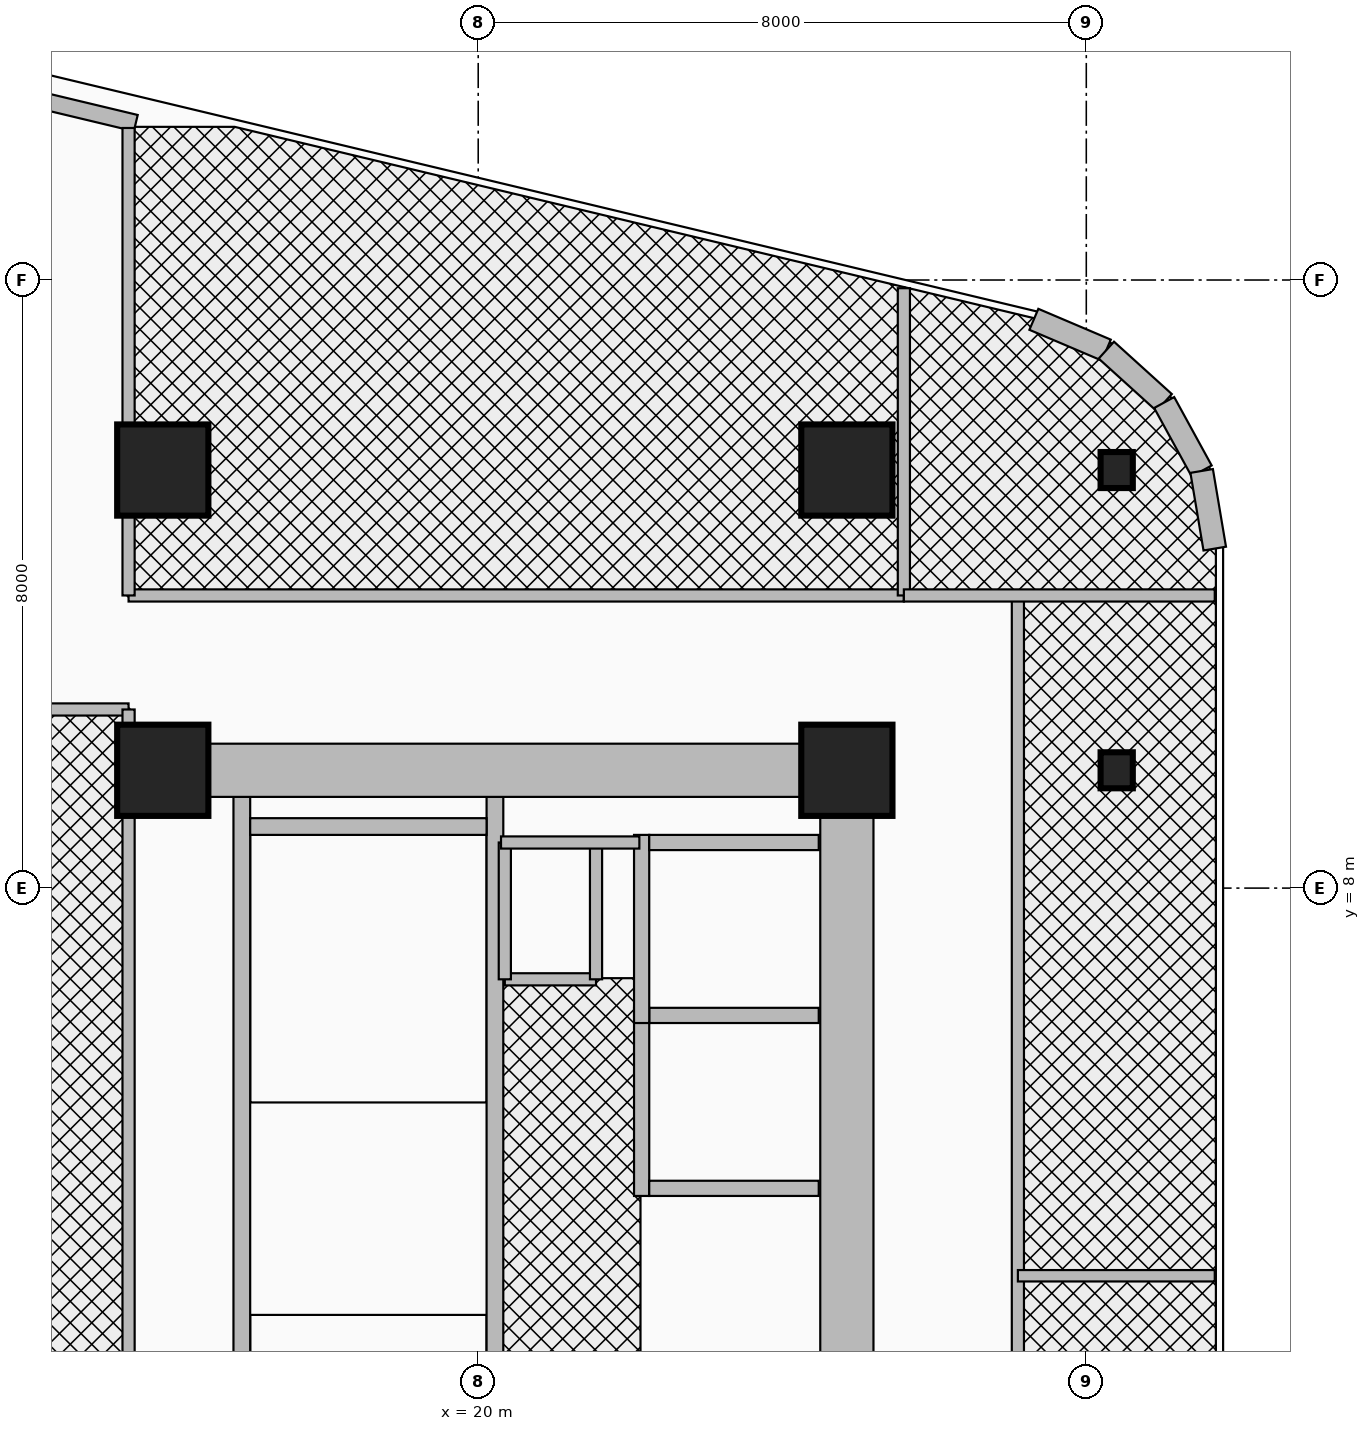
"""IFC4 building model, lengths in metres.
Left out: names, types, materials, properties, quantities, classifications, styles, units other than length and angle.
Written with IfcOpenShell. Run it as: python <this file> out.ifc"""

import sys

from ifc_helpers import new_model, si_unit, direction, frame, frame_2d, origin, origin_2d, place, context, subcontext, project, spatial, rectangle, i_section, extrude, source, transform, mapped, element, fill, save


model = new_model("IFC4")
c1 = context("Model", 3, precision=1e-05, world=origin(), true_north=direction((0.0, 1.0)))
c2 = subcontext(c1, "Body", "Model", "MODEL_VIEW")
j1 = project(units=[si_unit("LENGTHUNIT", "METRE"), si_unit("PLANEANGLEUNIT", "RADIAN")], contexts=[c1])
p1 = place(None, origin())
s1 = spatial("IfcSite", under=j1, at=p1, CompositionType="ELEMENT")
p2 = place(p1, origin())
s2 = spatial("IfcBuilding", under=s1, at=p2, CompositionType="ELEMENT")
p3 = place(p2, frame((0.0, 0.0, 131.6)))
s3 = spatial("IfcBuildingStorey", under=s2, at=p3, CompositionType="ELEMENT", Elevation=131.6)
for number, where, z_axis, x_axis in (
    (1, (16.89, 0.68, 0.0), (0.0, 0.0, 1.0), (0.0, 1.0, 0.0)),
    (2, (20.22, 0.68, 0.0), (0.0, 0.0, 1.0), (0.0, 1.0, 0.0)),
):
    element("IfcWall", number, at=place(p3, frame(where, z_axis=z_axis, x_axis=x_axis)), inside=s3, PredefinedType="SHEAR", context=c2, shape_type="SweptSolid", body=[
        extrude(rectangle(XDim=8.52, YDim=0.22, at=frame_2d((4.26, 0.0))), origin(), (0.0, 0.0, 1.0), 3.46),
    ])
p4 = place(p3, frame((17.0, 8.81, 0.0), z_axis=(0.0, 0.0, 1.0), x_axis=(1.0, 0.0, 0.0)))
e3 = element("IfcWall", 3, at=p4, inside=s3, PredefinedType="SHEAR", context=c2, shape_type="SweptSolid", body=[
    extrude(rectangle(XDim=3.11, YDim=0.22, at=frame_2d((1.555, 0.0))), origin(), (0.0, 0.0, 1.0), 3.46),
])
p5 = place(p3, frame((24.85, 0.95, 0.0), z_axis=(0.0, 0.0, 1.0), x_axis=(0.0, 1.0, 0.0)))
e4 = element("IfcWall", 4, at=p5, inside=s3, PredefinedType="SHEAR", context=c2, shape_type="SweptSolid", body=[
    extrude(rectangle(XDim=8.95, YDim=0.7, at=frame_2d((4.475, 0.0))), origin(), (0.0, 0.0, 1.0), 3.46),
])
p6 = place(p3, frame((15.85, 9.55, 0.0), z_axis=(0.0, 0.0, 1.0), x_axis=(1.0, 0.0, 0.0)))
e5 = element("IfcWall", 5, at=p6, inside=s3, PredefinedType="SHEAR", context=c2, shape_type="SweptSolid", body=[
    extrude(rectangle(XDim=9.0, YDim=0.7, at=frame_2d((4.5, 0.0))), origin(), (0.0, 0.0, 1.0), 3.46),
])
m1 = source(origin(), c2, "Body", "SweptSolid", [
    extrude(rectangle(XDim=1.2, YDim=1.2, at=origin_2d()), origin(), (0.0, 0.0, 1.0), 3.7),
])
for number, where, z_axis, x_axis in (
    (6, (15.85, 9.55, 0.0), (0.0, 0.0, 1.0), (1.0, 0.0, 0.0)),
    (7, (24.85, 9.55, 0.0), (0.0, 0.0, 1.0), (1.0, 0.0, 0.0)),
):
    element("IfcColumn", number, at=place(p3, frame(where, z_axis=z_axis, x_axis=x_axis)), inside=s3, PredefinedType="COLUMN", context=c2, shape_type="MappedRepresentation", body=[
        mapped(m1, transform((0.0, 0.0, 0.0), x_axis=(1.0, 0.0, 0.0), y_axis=(0.0, 1.0, 0.0), z_axis=(0.0, 0.0, 1.0), scale=1.0)),
    ])
m2 = source(origin(), c2, "Body", "SweptSolid", [
    extrude(i_section(OverallWidth=0.424, OverallDepth=0.474, WebThickness=0.048, FlangeThickness=0.077, at=origin_2d()), origin(), (0.0, 0.0, 1.0), 3.7),
])
p7 = place(p3, frame((28.4, 9.55, 0.0), z_axis=(0.0, 0.0, 1.0), x_axis=(1.0, 0.0, 0.0)))
e8 = element("IfcColumn", 8, at=p7, inside=s3, PredefinedType="COLUMN", context=c2, shape_type="MappedRepresentation", body=[
    mapped(m2, transform((0.0, 0.0, 0.0), x_axis=(1.0, 0.0, 0.0), y_axis=(0.0, 1.0, 0.0), z_axis=(0.0, 0.0, 1.0), scale=1.0)),
])
for number, where, z_axis, x_axis in (
    (9, (15.85, 13.5, 0.0), (0.0, 0.0, 1.0), (1.0, 0.0, 0.0)),
    (10, (24.85, 13.5, 0.0), (0.0, 0.0, 1.0), (1.0, 0.0, 0.0)),
):
    element("IfcColumn", number, at=place(p3, frame(where, z_axis=z_axis, x_axis=x_axis)), inside=s3, PredefinedType="COLUMN", context=c2, shape_type="MappedRepresentation", body=[
        mapped(m1, transform((0.0, 0.0, 0.0), x_axis=(1.0, 0.0, 0.0), y_axis=(0.0, 1.0, 0.0), z_axis=(0.0, 0.0, 1.0), scale=1.0)),
    ])
p8 = place(p3, frame((28.4, 13.5, 0.0), z_axis=(0.0, 0.0, 1.0), x_axis=(1.0, 0.0, 0.0)))
e11 = element("IfcColumn", 11, at=p8, inside=s3, PredefinedType="COLUMN", context=c2, shape_type="MappedRepresentation", body=[
    mapped(m2, transform((0.0, 0.0, 0.0), x_axis=(1.0, 0.0, 0.0), y_axis=(0.0, 1.0, 0.0), z_axis=(0.0, 0.0, 1.0), scale=1.0)),
])
p9 = place(p3, frame((13.355, 18.576, 0.0), z_axis=(0.0, 0.0, 1.0), x_axis=(0.97252211384, -0.232810519721, 0.0)))
e12 = element("IfcWall", 12, at=p9, inside=s3, PredefinedType="SOLIDWALL", context=c2, shape_type="SweptSolid", body=[
    extrude(rectangle(XDim=2.2, YDim=0.22, at=frame_2d((1.1, 0.0))), origin(), (0.0, 0.0, 1.0), 3.46),
])
p10 = place(p9, frame((0.65, 0.0, 0.95)))
e13 = element("IfcOpeningElement", 13, at=p10, cuts=e12, PredefinedType="OPENING", context=c2, shape_type="SweptSolid", body=[
    extrude(rectangle(XDim=0.9, YDim=1.3, at=frame_2d((0.45, 0.65))), frame((0.0, 0.125, 0.0), z_axis=(0.0, -1.0, 0.0), x_axis=(1.0, 0.0, 0.0)), (0.0, 0.0, 1.0), 0.25),
])
p11 = place(p3, frame((27.31, 15.483, 0.0), z_axis=(0.0, 0.0, 1.0), x_axis=(0.920250328759, -0.391330208927, 0.0)))
e14 = element("IfcWall", 14, at=p11, inside=s3, PredefinedType="SOLIDWALL", context=c2, shape_type="SweptSolid", body=[
    extrude(rectangle(XDim=1.036, YDim=0.3, at=frame_2d((0.518, 0.0))), origin(), (0.0, 0.0, 1.0), 3.46),
])
p12 = place(p3, frame((28.264, 15.077, 0.0), z_axis=(0.0, 0.0, 1.0), x_axis=(0.741208839713, -0.671274501178, 0.0)))
e15 = element("IfcWall", 15, at=p12, inside=s3, PredefinedType="SOLIDWALL", context=c2, shape_type="SweptSolid", body=[
    extrude(rectangle(XDim=1.026, YDim=0.3, at=frame_2d((0.513, 0.0))), origin(), (0.0, 0.0, 1.0), 3.46),
])
p13 = place(p3, frame((29.025, 14.388, 0.0), z_axis=(0.0, 0.0, 1.0), x_axis=(0.480284137298, -0.87711296163, 0.0)))
e16 = element("IfcWall", 16, at=p13, inside=s3, PredefinedType="SOLIDWALL", context=c2, shape_type="SweptSolid", body=[
    extrude(rectangle(XDim=1.027, YDim=0.3, at=frame_2d((0.513, 0.0))), origin(), (0.0, 0.0, 1.0), 3.46),
])
p14 = place(p3, frame((29.518, 13.488, 0.0), z_axis=(0.0, 0.0, 1.0), x_axis=(0.166156796952, -0.986099345313, 0.0)))
e17 = element("IfcWall", 17, at=p14, inside=s3, PredefinedType="SOLIDWALL", context=c2, shape_type="SweptSolid", body=[
    extrude(rectangle(XDim=1.036, YDim=0.3, at=frame_2d((0.518, 0.0))), origin(), (0.0, 0.0, 1.0), 3.46),
])
p15 = place(p3, frame((22.15, 3.95, 0.0), z_axis=(0.0, 0.0, 1.0), x_axis=(0.0, 1.0, 0.0)))
e18 = element("IfcWall", 18, at=p15, inside=s3, PredefinedType="MOVABLE", context=c2, shape_type="SweptSolid", body=[
    extrude(rectangle(XDim=2.475, YDim=0.2, at=frame_2d((1.238, 0.0))), origin(), (0.0, 0.0, 1.0), 3.46),
])
p16 = place(p15, frame((0.688, 0.0, 0.0)))
e19 = element("IfcOpeningElement", 19, at=p16, cuts=e18, PredefinedType="OPENING", context=c2, shape_type="SweptSolid", body=[
    extrude(rectangle(XDim=1.1, YDim=2.1, at=frame_2d((0.55, 1.05))), frame((0.0, 0.115, 0.0), z_axis=(0.0, -1.0, 0.0), x_axis=(1.0, 0.0, 0.0)), (0.0, 0.0, 1.0), 0.23),
])
for number, where, z_axis, x_axis in (
    (20, (22.25, 4.05, 0.0), (0.0, 0.0, 1.0), (1.0, 0.0, 0.0)),
    (21, (22.25, 6.325, 0.0), (0.0, 0.0, 1.0), (1.0, 0.0, 0.0)),
):
    element("IfcWall", number, at=place(p3, frame(where, z_axis=z_axis, x_axis=x_axis)), inside=s3, PredefinedType="MOVABLE", context=c2, shape_type="SweptSolid", body=[
        extrude(rectangle(XDim=2.23, YDim=0.2, at=frame_2d((1.115, 0.0))), origin(), (0.0, 0.0, 1.0), 2.245),
    ])
p17 = place(p3, frame((22.15, 6.225, 0.0), z_axis=(0.0, 0.0, 1.0), x_axis=(0.0, 1.0, 0.0)))
e22 = element("IfcWall", 22, at=p17, inside=s3, PredefinedType="MOVABLE", context=c2, shape_type="SweptSolid", body=[
    extrude(rectangle(XDim=2.475, YDim=0.2, at=frame_2d((1.237, 0.0))), origin(), (0.0, 0.0, 1.0), 3.46),
])
p18 = place(p17, frame((0.688, 0.0, 0.0)))
e23 = element("IfcOpeningElement", 23, at=p18, cuts=e22, PredefinedType="OPENING", context=c2, shape_type="SweptSolid", body=[
    extrude(rectangle(XDim=1.1, YDim=2.1, at=frame_2d((0.55, 1.05))), frame((0.0, 0.115, 0.0), z_axis=(0.0, -1.0, 0.0), x_axis=(1.0, 0.0, 0.0)), (0.0, 0.0, 1.0), 0.23),
])
p19 = place(p3, frame((22.25, 8.6, 0.0), z_axis=(0.0, 0.0, 1.0), x_axis=(1.0, 0.0, 0.0)))
e24 = element("IfcWall", 24, at=p19, inside=s3, PredefinedType="MOVABLE", context=c2, shape_type="SweptSolid", body=[
    extrude(rectangle(XDim=2.23, YDim=0.2, at=frame_2d((1.115, 0.0))), origin(), (0.0, 0.0, 1.0), 2.245),
])
p20 = place(p3, frame((20.35, 6.8, 0.0), z_axis=(0.0, 0.0, 1.0), x_axis=(1.0, 0.0, 0.0)))
e25 = element("IfcWall", 25, at=p20, inside=s3, PredefinedType="PARTITIONING", context=c2, shape_type="SweptSolid", body=[
    extrude(rectangle(XDim=1.2, YDim=0.16, at=frame_2d((0.6, 0.0))), origin(), (0.0, 0.0, 1.0), 3.46),
])
p21 = place(p20, frame((0.175, 0.0, 0.0)))
e26 = element("IfcOpeningElement", 26, at=p21, cuts=e25, PredefinedType="OPENING", context=c2, shape_type="SweptSolid", body=[
    extrude(rectangle(XDim=0.85, YDim=2.05, at=frame_2d((0.425, 1.025))), frame((0.0, 0.095, 0.0), z_axis=(0.0, -1.0, 0.0), x_axis=(1.0, 0.0, 0.0)), (0.0, 0.0, 1.0), 0.19),
])
for number, where, z_axis, x_axis in (
    (27, (21.55, 6.8, 0.0), (0.0, 0.0, 1.0), (0.0, 1.0, 0.0)),
    (28, (20.35, 6.8, 0.0), (0.0, 0.0, 1.0), (0.0, 1.0, 0.0)),
):
    element("IfcWall", number, at=place(p3, frame(where, z_axis=z_axis, x_axis=x_axis)), inside=s3, PredefinedType="PARTITIONING", context=c2, shape_type="SweptSolid", body=[
        extrude(rectangle(XDim=1.8, YDim=0.16, at=frame_2d((0.9, 0.0))), origin(), (0.0, 0.0, 1.0), 3.46),
    ])
p22 = place(p3, frame((20.3, 8.6, 0.0), z_axis=(0.0, 0.0, 1.0), x_axis=(1.0, 0.0, 0.0)))
e29 = element("IfcWall", 29, at=p22, inside=s3, PredefinedType="PARTITIONING", context=c2, shape_type="SweptSolid", body=[
    extrude(rectangle(XDim=1.82, YDim=0.16, at=frame_2d((0.91, 0.0))), origin(), (0.0, 0.0, 1.0), 3.46),
])
p23 = place(p3, frame((15.4, 11.85, 0.0), z_axis=(0.0, 0.0, 1.0), x_axis=(1.0, 0.0, 0.0)))
e30 = element("IfcWall", 30, at=p23, inside=s3, PredefinedType="PARTITIONING", context=c2, shape_type="SweptSolid", body=[
    extrude(rectangle(XDim=10.2, YDim=0.16, at=frame_2d((5.1, 0.0))), origin(), (0.0, 0.0, 1.0), 2.834),
])
p24 = place(p23, frame((4.65, 0.0, 0.0)))
e31 = element("IfcOpeningElement", 31, at=p24, cuts=e30, PredefinedType="OPENING", context=c2, shape_type="SweptSolid", body=[
    extrude(rectangle(XDim=0.9, YDim=2.1, at=frame_2d((0.45, 1.05))), frame((0.0, 0.095, 0.0), z_axis=(0.0, -1.0, 0.0), x_axis=(1.0, 0.0, 0.0)), (0.0, 0.0, 1.0), 0.19),
])
p25 = place(p3, frame((15.4, 11.85, 0.0), z_axis=(0.0, 0.0, 1.0), x_axis=(0.0, 1.0, 0.0)))
e32 = element("IfcWall", 32, at=p25, inside=s3, PredefinedType="PARTITIONING", context=c2, shape_type="SweptSolid", body=[
    extrude(rectangle(XDim=6.15, YDim=0.16, at=frame_2d((3.075, 0.0))), origin(), (0.0, 0.0, 1.0), 2.666),
])
p26 = place(p3, frame((25.6, 11.85, 0.0), z_axis=(0.0, 0.0, 1.0), x_axis=(0.0, 1.0, 0.0)))
e33 = element("IfcWall", 33, at=p26, inside=s3, PredefinedType="PARTITIONING", context=c2, shape_type="SweptSolid", body=[
    extrude(rectangle(XDim=4.042, YDim=0.16, at=frame_2d((2.021, 0.0))), origin(), (0.0, 0.0, 1.0), 2.666),
])
p27 = place(p3, frame((27.1, -11.661, 0.0), z_axis=(0.0, 0.0, 1.0), x_axis=(0.0, 1.0, 0.0)))
e34 = element("IfcWall", 34, at=p27, inside=s3, PredefinedType="PARTITIONING", context=c2, shape_type="SweptSolid", body=[
    extrude(rectangle(XDim=23.511, YDim=0.16, at=frame_2d((11.755, 0.0))), origin(), (0.0, 0.0, 1.0), 2.666),
])
p28 = place(p27, frame((2.56, 0.0, 0.0)))
e35 = element("IfcOpeningElement", 35, at=p28, cuts=e34, PredefinedType="OPENING", context=c2, shape_type="SweptSolid", body=[
    extrude(rectangle(XDim=0.9, YDim=2.1, at=frame_2d((0.45, 1.05))), frame((0.0, 0.095, 0.0), z_axis=(0.0, -1.0, 0.0), x_axis=(1.0, 0.0, 0.0)), (0.0, 0.0, 1.0), 0.19),
])
p29 = place(p27, frame((9.451, 0.0, 0.0)))
e36 = element("IfcOpeningElement", 36, at=p29, cuts=e34, PredefinedType="OPENING", context=c2, shape_type="SweptSolid", body=[
    extrude(rectangle(XDim=1.8, YDim=2.15, at=frame_2d((0.9, 1.075))), frame((0.0, 0.095, 0.0), z_axis=(0.0, -1.0, 0.0), x_axis=(1.0, 0.0, 0.0)), (0.0, 0.0, 1.0), 0.19),
])
p30 = place(p27, frame((18.136, 0.0, 0.0)))
e37 = element("IfcOpeningElement", 37, at=p30, cuts=e34, PredefinedType="OPENING", context=c2, shape_type="SweptSolid", body=[
    extrude(rectangle(XDim=1.8, YDim=2.15, at=frame_2d((0.9, 1.075))), frame((0.0, 0.095, 0.0), z_axis=(0.0, -1.0, 0.0), x_axis=(1.0, 0.0, 0.0)), (0.0, 0.0, 1.0), 0.19),
])
p31 = place(p3, frame((25.6, 11.85, 0.0), z_axis=(0.0, 0.0, 1.0), x_axis=(1.0, 0.0, 0.0)))
e38 = element("IfcWall", 38, at=p31, inside=s3, PredefinedType="PARTITIONING", context=c2, shape_type="SweptSolid", body=[
    extrude(rectangle(XDim=4.09, YDim=0.16, at=frame_2d((2.045, 0.0))), origin(), (0.0, 0.0, 1.0), 2.896),
])
p32 = place(p31, frame((0.3, 0.0, 0.0)))
e39 = element("IfcOpeningElement", 39, at=p32, cuts=e38, PredefinedType="OPENING", context=c2, shape_type="SweptSolid", body=[
    extrude(rectangle(XDim=0.9, YDim=2.1, at=frame_2d((0.45, 1.05))), frame((0.0, 0.095, 0.0), z_axis=(0.0, -1.0, 0.0), x_axis=(1.0, 0.0, 0.0)), (0.0, 0.0, 1.0), 0.19),
])
p33 = place(p3, frame((27.1, 2.9, 0.0), z_axis=(0.0, 0.0, 1.0), x_axis=(1.0, 0.0, 0.0)))
e40 = element("IfcWall", 40, at=p33, inside=s3, PredefinedType="PARTITIONING", context=c2, shape_type="SweptSolid", body=[
    extrude(rectangle(XDim=2.59, YDim=0.15, at=frame_2d((1.295, 0.0))), origin(), (0.0, 0.0, 1.0), 2.896),
])
p34 = place(p3, frame((13.3, 10.35, 0.0), z_axis=(0.0, 0.0, 1.0), x_axis=(1.0, 0.0, 0.0)))
e41 = element("IfcWall", 41, at=p34, inside=s3, PredefinedType="PARTITIONING", context=c2, shape_type="SweptSolid", body=[
    extrude(rectangle(XDim=2.1, YDim=0.16, at=frame_2d((1.05, 0.0))), origin(), (0.0, 0.0, 1.0), 2.666),
])
p35 = place(p34, frame((0.45, 0.0, 0.0)))
e42 = element("IfcOpeningElement", 42, at=p35, cuts=e41, PredefinedType="OPENING", context=c2, shape_type="SweptSolid", body=[
    extrude(rectangle(XDim=0.9, YDim=2.1, at=frame_2d((0.45, 1.05))), frame((0.0, 0.095, 0.0), z_axis=(0.0, -1.0, 0.0), x_axis=(1.0, 0.0, 0.0)), (0.0, 0.0, 1.0), 0.19),
])
p36 = place(p3, frame((15.4, 1.0, 0.0), z_axis=(0.0, 0.0, 1.0), x_axis=(0.0, 1.0, 0.0)))
e43 = element("IfcWall", 43, at=p36, inside=s3, PredefinedType="PARTITIONING", context=c2, shape_type="SweptSolid", body=[
    extrude(rectangle(XDim=9.35, YDim=0.16, at=frame_2d((4.675, 0.0))), origin(), (0.0, 0.0, 1.0), 2.245),
])
p37 = place(p10, origin())
e44 = element("IfcWindow", 44, at=p37, inside=s3, PartitioningType="SINGLE_PANEL", PredefinedType="WINDOW", context=c2, shape_type="SweptSolid", body=[
    extrude(rectangle(XDim=0.9, YDim=1.3, at=frame_2d((0.45, 0.65))), frame((0.0, 0.03, 0.0), z_axis=(0.0, -1.0, 0.0), x_axis=(1.0, 0.0, 0.0)), (0.0, 0.0, 1.0), 0.06),
])
fill(e13, e44)
p38 = place(p16, origin())
e45 = element("IfcDoor", 45, at=p38, inside=s3, OperationType="DOUBLE_DOOR_SLIDING", PredefinedType="DOOR", context=c2, shape_type="SweptSolid", body=[
    extrude(rectangle(XDim=1.1, YDim=2.1, at=frame_2d((0.55, 1.05))), frame((0.0, 0.025, 0.0), z_axis=(0.0, -1.0, 0.0), x_axis=(1.0, 0.0, 0.0)), (0.0, 0.0, 1.0), 0.05),
])
fill(e19, e45)
p39 = place(p18, origin())
e46 = element("IfcDoor", 46, at=p39, inside=s3, OperationType="DOUBLE_DOOR_SLIDING", PredefinedType="DOOR", context=c2, shape_type="SweptSolid", body=[
    extrude(rectangle(XDim=1.1, YDim=2.1, at=frame_2d((0.55, 1.05))), frame((0.0, 0.025, 0.0), z_axis=(0.0, -1.0, 0.0), x_axis=(1.0, 0.0, 0.0)), (0.0, 0.0, 1.0), 0.05),
])
fill(e23, e46)
p40 = place(p21, origin())
e47 = element("IfcDoor", 47, at=p40, inside=s3, OperationType="SINGLE_SWING_RIGHT", PredefinedType="DOOR", context=c2, shape_type="SweptSolid", body=[
    extrude(rectangle(XDim=0.85, YDim=2.05, at=frame_2d((0.425, 1.025))), frame((0.0, 0.025, 0.0), z_axis=(0.0, -1.0, 0.0), x_axis=(1.0, 0.0, 0.0)), (0.0, 0.0, 1.0), 0.05),
])
fill(e26, e47)
p41 = place(p24, origin())
e48 = element("IfcDoor", 48, at=p41, inside=s3, OperationType="SINGLE_SWING_RIGHT", PredefinedType="DOOR", context=c2, shape_type="SweptSolid", body=[
    extrude(rectangle(XDim=0.9, YDim=2.1, at=frame_2d((0.45, 1.05))), frame((0.0, 0.025, 0.0), z_axis=(0.0, -1.0, 0.0), x_axis=(1.0, 0.0, 0.0)), (0.0, 0.0, 1.0), 0.05),
])
fill(e31, e48)
p42 = place(p32, origin())
e49 = element("IfcDoor", 49, at=p42, inside=s3, OperationType="SINGLE_SWING_RIGHT", PredefinedType="DOOR", context=c2, shape_type="SweptSolid", body=[
    extrude(rectangle(XDim=0.9, YDim=2.1, at=frame_2d((0.45, 1.05))), frame((0.0, 0.025, 0.0), z_axis=(0.0, -1.0, 0.0), x_axis=(1.0, 0.0, 0.0)), (0.0, 0.0, 1.0), 0.05),
])
fill(e39, e49)
p43 = place(p30, frame((1.8, 0.0, 0.0), z_axis=(0.0, 0.0, 1.0), x_axis=(-1.0, 0.0, 0.0)))
e50 = element("IfcDoor", 50, at=p43, inside=s3, OperationType="DOUBLE_DOOR_SINGLE_SWING", PredefinedType="DOOR", context=c2, shape_type="SweptSolid", body=[
    extrude(rectangle(XDim=1.8, YDim=2.15, at=frame_2d((0.9, 1.075))), frame((0.0, 0.025, 0.0), z_axis=(0.0, -1.0, 0.0), x_axis=(1.0, 0.0, 0.0)), (0.0, 0.0, 1.0), 0.05),
])
fill(e37, e50)
p44 = place(p35, origin())
e51 = element("IfcDoor", 51, at=p44, inside=s3, OperationType="SINGLE_SWING_RIGHT", PredefinedType="DOOR", context=c2, shape_type="SweptSolid", body=[
    extrude(rectangle(XDim=0.9, YDim=2.1, at=frame_2d((0.45, 1.05))), frame((0.0, 0.025, 0.0), z_axis=(0.0, -1.0, 0.0), x_axis=(1.0, 0.0, 0.0)), (0.0, 0.0, 1.0), 0.05),
])
fill(e42, e51)
save(model, sys.argv[1])
